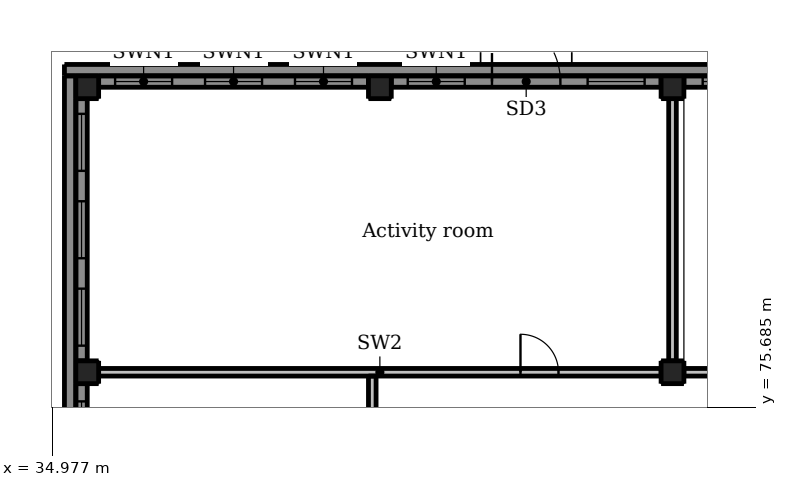
"""IFC4 building model, lengths in metres.
Left out: names, types, materials, properties, quantities, classifications, styles, units other than length and angle.
Written with IfcOpenShell. Run it as: python <this file> out.ifc"""

import sys

from ifc_helpers import new_model, si_unit, direction, frame, frame_2d, origin, origin_2d, place, context, subcontext, project, spatial, rectangle, extrude, element, fill, save


model = new_model("IFC4")
c1 = context("Model", 3, precision=1e-05, world=origin(), true_north=direction((0.0, 1.0)))
c2 = subcontext(c1, "Body", "Model", "MODEL_VIEW")
j1 = project(units=[si_unit("LENGTHUNIT", "METRE"), si_unit("PLANEANGLEUNIT", "RADIAN")], contexts=[c1])
p1 = place(None, origin())
s1 = spatial("IfcSite", under=j1, at=p1, CompositionType="ELEMENT")
p2 = place(p1, origin())
s2 = spatial("IfcBuilding", under=s1, at=p2, CompositionType="ELEMENT")
p3 = place(p2, origin())
s3 = spatial("IfcBuildingStorey", under=s2, at=p3, CompositionType="ELEMENT", Elevation=0.0)
for number, where, z_axis, x_axis in (
    (1, (35.9, 76.6, -0.3), (0.0, 0.0, 1.0), (1.0, 0.0, 0.0)),
    (2, (51.3, 76.6, -0.3), (0.0, 0.0, 1.0), (1.0, 0.0, 0.0)),
    (3, (35.9, 84.1, -0.3), (0.0, 0.0, 1.0), (1.0, 0.0, 0.0)),
    (4, (51.3, 84.1, -0.3), (0.0, 0.0, 1.0), (1.0, 0.0, 0.0)),
    (5, (43.6, 84.1, -0.3), (0.0, 0.0, 1.0), (1.0, 0.0, 0.0)),
):
    element("IfcColumn", number, at=place(p3, frame(where, z_axis=z_axis, x_axis=x_axis)), inside=s3, PredefinedType="COLUMN", context=c2, shape_type="SweptSolid", body=[
        extrude(rectangle(XDim=0.6, YDim=0.6, at=origin_2d()), origin(), (0.0, 0.0, 1.0), 5.5),
    ])
p4 = place(p3, frame((35.75, 69.0, 0.0), z_axis=(0.0, 0.0, 1.0), x_axis=(0.0, 1.0, 0.0)))
e6 = element("IfcWall", 6, at=p4, inside=s3, PredefinedType="SOLIDWALL", context=c2, shape_type="SweptSolid", body=[
    extrude(rectangle(XDim=7.3, YDim=0.3, at=frame_2d((3.65, 0.0))), origin(), (0.0, 0.0, 1.0), 4.3),
])
p5 = place(p4, frame((0.467, 0.0, 0.9)))
e7 = element("IfcOpeningElement", 7, at=p5, cuts=e6, PredefinedType="OPENING", context=c2, shape_type="SweptSolid", body=[
    extrude(rectangle(XDim=1.5, YDim=1.5, at=frame_2d((0.75, 0.75))), frame((0.0, 0.16, 0.0), z_axis=(0.0, -1.0, 0.0), x_axis=(1.0, 0.0, 0.0)), (0.0, 0.0, 1.0), 0.32),
])
p6 = place(p4, frame((2.9, 0.0, 0.9)))
e8 = element("IfcOpeningElement", 8, at=p6, cuts=e6, PredefinedType="OPENING", context=c2, shape_type="SweptSolid", body=[
    extrude(rectangle(XDim=1.5, YDim=1.5, at=frame_2d((0.75, 0.75))), frame((0.0, 0.16, 0.0), z_axis=(0.0, -1.0, 0.0), x_axis=(1.0, 0.0, 0.0)), (0.0, 0.0, 1.0), 0.32),
])
p7 = place(p4, frame((5.333, 0.0, 0.9)))
e9 = element("IfcOpeningElement", 9, at=p7, cuts=e6, PredefinedType="OPENING", context=c2, shape_type="SweptSolid", body=[
    extrude(rectangle(XDim=1.5, YDim=1.5, at=frame_2d((0.75, 0.75))), frame((0.0, 0.16, 0.0), z_axis=(0.0, -1.0, 0.0), x_axis=(1.0, 0.0, 0.0)), (0.0, 0.0, 1.0), 0.32),
])
p8 = place(p3, frame((35.75, 76.9, 0.0), z_axis=(0.0, 0.0, 1.0), x_axis=(0.0, 1.0, 0.0)))
e10 = element("IfcWall", 10, at=p8, inside=s3, PredefinedType="SOLIDWALL", context=c2, shape_type="SweptSolid", body=[
    extrude(rectangle(XDim=6.9, YDim=0.3, at=frame_2d((3.45, 0.0))), origin(), (0.0, 0.0, 1.0), 4.3),
])
p9 = place(p8, frame((0.4, 0.0, 0.9)))
e11 = element("IfcOpeningElement", 11, at=p9, cuts=e10, PredefinedType="OPENING", context=c2, shape_type="SweptSolid", body=[
    extrude(rectangle(XDim=1.5, YDim=1.5, at=frame_2d((0.75, 0.75))), frame((0.0, 0.16, 0.0), z_axis=(0.0, -1.0, 0.0), x_axis=(1.0, 0.0, 0.0)), (0.0, 0.0, 1.0), 0.32),
])
p10 = place(p8, frame((2.7, 0.0, 0.9)))
e12 = element("IfcOpeningElement", 12, at=p10, cuts=e10, PredefinedType="OPENING", context=c2, shape_type="SweptSolid", body=[
    extrude(rectangle(XDim=1.5, YDim=1.5, at=frame_2d((0.75, 0.75))), frame((0.0, 0.16, 0.0), z_axis=(0.0, -1.0, 0.0), x_axis=(1.0, 0.0, 0.0)), (0.0, 0.0, 1.0), 0.32),
])
p11 = place(p8, frame((5.0, 0.0, 0.9)))
e13 = element("IfcOpeningElement", 13, at=p11, cuts=e10, PredefinedType="OPENING", context=c2, shape_type="SweptSolid", body=[
    extrude(rectangle(XDim=1.5, YDim=1.5, at=frame_2d((0.75, 0.75))), frame((0.0, 0.16, 0.0), z_axis=(0.0, -1.0, 0.0), x_axis=(1.0, 0.0, 0.0)), (0.0, 0.0, 1.0), 0.32),
])
p12 = place(p3, frame((36.2, 84.25, 0.0), z_axis=(0.0, 0.0, 1.0), x_axis=(1.0, 0.0, 0.0)))
e14 = element("IfcWall", 14, at=p12, inside=s3, PredefinedType="SOLIDWALL", context=c2, shape_type="SweptSolid", body=[
    extrude(rectangle(XDim=7.1, YDim=0.3, at=frame_2d((3.55, 0.0))), origin(), (0.0, 0.0, 1.0), 4.3),
])
p13 = place(p12, frame((0.433, 0.0, 0.9)))
e15 = element("IfcOpeningElement", 15, at=p13, cuts=e14, PredefinedType="OPENING", context=c2, shape_type="SweptSolid", body=[
    extrude(rectangle(XDim=1.5, YDim=1.5, at=frame_2d((0.75, 0.75))), frame((0.0, 0.16, 0.0), z_axis=(0.0, -1.0, 0.0), x_axis=(1.0, 0.0, 0.0)), (0.0, 0.0, 1.0), 0.32),
])
p14 = place(p12, frame((2.8, 0.0, 0.9)))
e16 = element("IfcOpeningElement", 16, at=p14, cuts=e14, PredefinedType="OPENING", context=c2, shape_type="SweptSolid", body=[
    extrude(rectangle(XDim=1.5, YDim=1.5, at=frame_2d((0.75, 0.75))), frame((0.0, 0.16, 0.0), z_axis=(0.0, -1.0, 0.0), x_axis=(1.0, 0.0, 0.0)), (0.0, 0.0, 1.0), 0.32),
])
p15 = place(p12, frame((5.167, 0.0, 0.9)))
e17 = element("IfcOpeningElement", 17, at=p15, cuts=e14, PredefinedType="OPENING", context=c2, shape_type="SweptSolid", body=[
    extrude(rectangle(XDim=1.5, YDim=1.5, at=frame_2d((0.75, 0.75))), frame((0.0, 0.16, 0.0), z_axis=(0.0, -1.0, 0.0), x_axis=(1.0, 0.0, 0.0)), (0.0, 0.0, 1.0), 0.32),
])
p16 = place(p3, frame((43.9, 84.25, 0.0), z_axis=(0.0, 0.0, 1.0), x_axis=(1.0, 0.0, 0.0)))
e18 = element("IfcWall", 18, at=p16, inside=s3, PredefinedType="SOLIDWALL", context=c2, shape_type="SweptSolid", body=[
    extrude(rectangle(XDim=7.1, YDim=0.3, at=frame_2d((3.55, 0.0))), origin(), (0.0, 0.0, 1.0), 4.3),
])
p17 = place(p16, frame((2.65, 0.0, 0.0)))
e19 = element("IfcOpeningElement", 19, at=p17, cuts=e18, PredefinedType="OPENING", context=c2, shape_type="SweptSolid", body=[
    extrude(rectangle(XDim=1.8, YDim=2.1, at=frame_2d((0.9, 1.05))), frame((0.0, 0.16, 0.0), z_axis=(0.0, -1.0, 0.0), x_axis=(1.0, 0.0, 0.0)), (0.0, 0.0, 1.0), 0.32),
])
p18 = place(p16, frame((0.433, 0.0, 0.9)))
e20 = element("IfcOpeningElement", 20, at=p18, cuts=e18, PredefinedType="OPENING", context=c2, shape_type="SweptSolid", body=[
    extrude(rectangle(XDim=1.5, YDim=1.5, at=frame_2d((0.75, 0.75))), frame((0.0, 0.16, 0.0), z_axis=(0.0, -1.0, 0.0), x_axis=(1.0, 0.0, 0.0)), (0.0, 0.0, 1.0), 0.32),
])
p19 = place(p16, frame((5.167, 0.0, 0.9)))
e21 = element("IfcOpeningElement", 21, at=p19, cuts=e18, PredefinedType="OPENING", context=c2, shape_type="SweptSolid", body=[
    extrude(rectangle(XDim=1.5, YDim=1.5, at=frame_2d((0.75, 0.75))), frame((0.0, 0.16, 0.0), z_axis=(0.0, -1.0, 0.0), x_axis=(1.0, 0.0, 0.0)), (0.0, 0.0, 1.0), 0.32),
])
p20 = place(p3, frame((51.6, 84.25, 0.0), z_axis=(0.0, 0.0, 1.0), x_axis=(1.0, 0.0, 0.0)))
e22 = element("IfcWall", 22, at=p20, inside=s3, PredefinedType="SOLIDWALL", context=c2, shape_type="SweptSolid", body=[
    extrude(rectangle(XDim=7.467, YDim=0.3, at=frame_2d((3.733, 0.0))), origin(), (0.0, 0.0, 1.0), 4.3),
])
p21 = place(p20, frame((0.494, 0.0, 0.9)))
e23 = element("IfcOpeningElement", 23, at=p21, cuts=e22, PredefinedType="OPENING", context=c2, shape_type="SweptSolid", body=[
    extrude(rectangle(XDim=1.5, YDim=1.5, at=frame_2d((0.75, 0.75))), frame((0.0, 0.16, 0.0), z_axis=(0.0, -1.0, 0.0), x_axis=(1.0, 0.0, 0.0)), (0.0, 0.0, 1.0), 0.32),
])
p22 = place(p20, frame((2.983, 0.0, 0.9)))
e24 = element("IfcOpeningElement", 24, at=p22, cuts=e22, PredefinedType="OPENING", context=c2, shape_type="SweptSolid", body=[
    extrude(rectangle(XDim=1.5, YDim=1.5, at=frame_2d((0.75, 0.75))), frame((0.0, 0.16, 0.0), z_axis=(0.0, -1.0, 0.0), x_axis=(1.0, 0.0, 0.0)), (0.0, 0.0, 1.0), 0.32),
])
p23 = place(p20, frame((5.472, 0.0, 0.9)))
e25 = element("IfcOpeningElement", 25, at=p23, cuts=e22, PredefinedType="OPENING", context=c2, shape_type="SweptSolid", body=[
    extrude(rectangle(XDim=1.5, YDim=1.5, at=frame_2d((0.75, 0.75))), frame((0.0, 0.16, 0.0), z_axis=(0.0, -1.0, 0.0), x_axis=(1.0, 0.0, 0.0)), (0.0, 0.0, 1.0), 0.32),
])
p24 = place(p3, frame((35.3, 84.55, -0.3), z_axis=(0.0, 0.0, 1.0), x_axis=(1.0, 0.0, 0.0)))
e26 = element("IfcWall", 26, at=p24, inside=s3, PredefinedType="SOLIDWALL", context=c2, shape_type="SweptSolid", body=[
    extrude(rectangle(XDim=64.7, YDim=0.3, at=frame_2d((32.35, 0.0))), origin(), (0.0, 0.0, 1.0), 0.3),
])
p25 = place(p3, frame((35.45, 8.0, -0.3), z_axis=(0.0, 0.0, 1.0), x_axis=(0.0, 1.0, 0.0)))
e27 = element("IfcWall", 27, at=p25, inside=s3, PredefinedType="SOLIDWALL", context=c2, shape_type="SweptSolid", body=[
    extrude(rectangle(XDim=76.4, YDim=0.3, at=frame_2d((38.2, 0.0))), origin(), (0.0, 0.0, 1.0), 0.3),
])
p26 = place(p3, frame((43.4, 68.8, 0.0), z_axis=(0.0, 0.0, 1.0), x_axis=(0.0, 1.0, 0.0)))
e28 = element("IfcWall", 28, at=p26, inside=s3, PredefinedType="PARTITIONING", context=c2, shape_type="SweptSolid", body=[
    extrude(rectangle(XDim=7.7, YDim=0.2, at=frame_2d((3.85, 0.0))), origin(), (0.0, 0.0, 1.0), 4.1),
])
p27 = place(p26, frame((3.35, 0.0, 0.0)))
e29 = element("IfcOpeningElement", 29, at=p27, cuts=e28, PredefinedType="OPENING", context=c2, shape_type="SweptSolid", body=[
    extrude(rectangle(XDim=1.0, YDim=2.1, at=frame_2d((0.5, 1.05))), frame((0.0, 0.11, 0.0), z_axis=(0.0, -1.0, 0.0), x_axis=(1.0, 0.0, 0.0)), (0.0, 0.0, 1.0), 0.22),
])
p28 = place(p3, frame((36.2, 76.6, 0.0), z_axis=(0.0, 0.0, 1.0), x_axis=(1.0, 0.0, 0.0)))
e30 = element("IfcWall", 30, at=p28, inside=s3, PredefinedType="PARTITIONING", context=c2, shape_type="SweptSolid", body=[
    extrude(rectangle(XDim=14.8, YDim=0.2, at=frame_2d((7.4, 0.0))), origin(), (0.0, 0.0, 1.0), 4.1),
])
p29 = place(p28, frame((11.1, 0.0, 0.0)))
e31 = element("IfcOpeningElement", 31, at=p29, cuts=e30, PredefinedType="OPENING", context=c2, shape_type="SweptSolid", body=[
    extrude(rectangle(XDim=1.0, YDim=2.1, at=frame_2d((0.5, 1.05))), frame((0.0, 0.11, 0.0), z_axis=(0.0, -1.0, 0.0), x_axis=(1.0, 0.0, 0.0)), (0.0, 0.0, 1.0), 0.22),
])
p30 = place(p3, frame((51.3, 76.9, 0.0), z_axis=(0.0, 0.0, 1.0), x_axis=(0.0, 1.0, 0.0)))
e32 = element("IfcWall", 32, at=p30, inside=s3, PredefinedType="PARTITIONING", context=c2, shape_type="SweptSolid", body=[
    extrude(rectangle(XDim=6.9, YDim=0.2, at=frame_2d((3.45, 0.0))), origin(), (0.0, 0.0, 1.0), 4.1),
])
p31 = place(p3, frame((51.6, 76.6, 0.0), z_axis=(0.0, 0.0, 1.0), x_axis=(1.0, 0.0, 0.0)))
e33 = element("IfcWall", 33, at=p31, inside=s3, PredefinedType="PARTITIONING", context=c2, shape_type="SweptSolid", body=[
    extrude(rectangle(XDim=7.667, YDim=0.2, at=frame_2d((3.833, 0.0))), origin(), (0.0, 0.0, 1.0), 4.1),
])
p32 = place(p31, frame((3.333, 0.0, 0.0)))
e34 = element("IfcOpeningElement", 34, at=p32, cuts=e33, PredefinedType="OPENING", context=c2, shape_type="SweptSolid", body=[
    extrude(rectangle(XDim=1.0, YDim=2.1, at=frame_2d((0.5, 1.05))), frame((0.0, 0.11, 0.0), z_axis=(0.0, -1.0, 0.0), x_axis=(1.0, 0.0, 0.0)), (0.0, 0.0, 1.0), 0.22),
])
p33 = place(p7, origin())
e35 = element("IfcWindow", 35, at=p33, inside=s3, PartitioningType="DOUBLE_PANEL_HORIZONTAL", PredefinedType="WINDOW", context=c2, shape_type="SweptSolid", body=[
    extrude(rectangle(XDim=1.5, YDim=1.5, at=frame_2d((0.75, 0.75))), frame((0.0, 0.03, 0.0), z_axis=(0.0, -1.0, 0.0), x_axis=(1.0, 0.0, 0.0)), (0.0, 0.0, 1.0), 0.06),
])
fill(e9, e35)
p34 = place(p9, origin())
e36 = element("IfcWindow", 36, at=p34, inside=s3, PartitioningType="DOUBLE_PANEL_HORIZONTAL", PredefinedType="WINDOW", context=c2, shape_type="SweptSolid", body=[
    extrude(rectangle(XDim=1.5, YDim=1.5, at=frame_2d((0.75, 0.75))), frame((0.0, 0.03, 0.0), z_axis=(0.0, -1.0, 0.0), x_axis=(1.0, 0.0, 0.0)), (0.0, 0.0, 1.0), 0.06),
])
fill(e11, e36)
p35 = place(p10, origin())
e37 = element("IfcWindow", 37, at=p35, inside=s3, PartitioningType="DOUBLE_PANEL_HORIZONTAL", PredefinedType="WINDOW", context=c2, shape_type="SweptSolid", body=[
    extrude(rectangle(XDim=1.5, YDim=1.5, at=frame_2d((0.75, 0.75))), frame((0.0, 0.03, 0.0), z_axis=(0.0, -1.0, 0.0), x_axis=(1.0, 0.0, 0.0)), (0.0, 0.0, 1.0), 0.06),
])
fill(e12, e37)
p36 = place(p11, origin())
e38 = element("IfcWindow", 38, at=p36, inside=s3, PartitioningType="DOUBLE_PANEL_HORIZONTAL", PredefinedType="WINDOW", context=c2, shape_type="SweptSolid", body=[
    extrude(rectangle(XDim=1.5, YDim=1.5, at=frame_2d((0.75, 0.75))), frame((0.0, 0.03, 0.0), z_axis=(0.0, -1.0, 0.0), x_axis=(1.0, 0.0, 0.0)), (0.0, 0.0, 1.0), 0.06),
])
fill(e13, e38)
p37 = place(p13, origin())
e39 = element("IfcWindow", 39, at=p37, inside=s3, PartitioningType="DOUBLE_PANEL_HORIZONTAL", PredefinedType="WINDOW", context=c2, shape_type="SweptSolid", body=[
    extrude(rectangle(XDim=1.5, YDim=1.5, at=frame_2d((0.75, 0.75))), frame((0.0, 0.03, 0.0), z_axis=(0.0, -1.0, 0.0), x_axis=(1.0, 0.0, 0.0)), (0.0, 0.0, 1.0), 0.06),
])
fill(e15, e39)
p38 = place(p14, origin())
e40 = element("IfcWindow", 40, at=p38, inside=s3, PartitioningType="DOUBLE_PANEL_HORIZONTAL", PredefinedType="WINDOW", context=c2, shape_type="SweptSolid", body=[
    extrude(rectangle(XDim=1.5, YDim=1.5, at=frame_2d((0.75, 0.75))), frame((0.0, 0.03, 0.0), z_axis=(0.0, -1.0, 0.0), x_axis=(1.0, 0.0, 0.0)), (0.0, 0.0, 1.0), 0.06),
])
fill(e16, e40)
p39 = place(p15, origin())
e41 = element("IfcWindow", 41, at=p39, inside=s3, PartitioningType="DOUBLE_PANEL_HORIZONTAL", PredefinedType="WINDOW", context=c2, shape_type="SweptSolid", body=[
    extrude(rectangle(XDim=1.5, YDim=1.5, at=frame_2d((0.75, 0.75))), frame((0.0, 0.03, 0.0), z_axis=(0.0, -1.0, 0.0), x_axis=(1.0, 0.0, 0.0)), (0.0, 0.0, 1.0), 0.06),
])
fill(e17, e41)
p40 = place(p17, origin())
e42 = element("IfcDoor", 42, at=p40, inside=s3, OperationType="DOUBLE_DOOR_SINGLE_SWING", PredefinedType="DOOR", context=c2, shape_type="SweptSolid", body=[
    extrude(rectangle(XDim=1.8, YDim=2.1, at=frame_2d((0.9, 1.05))), frame((0.0, 0.025, 0.0), z_axis=(0.0, -1.0, 0.0), x_axis=(1.0, 0.0, 0.0)), (0.0, 0.0, 1.0), 0.05),
])
fill(e19, e42)
p41 = place(p18, origin())
e43 = element("IfcWindow", 43, at=p41, inside=s3, PartitioningType="DOUBLE_PANEL_HORIZONTAL", PredefinedType="WINDOW", context=c2, shape_type="SweptSolid", body=[
    extrude(rectangle(XDim=1.5, YDim=1.5, at=frame_2d((0.75, 0.75))), frame((0.0, 0.03, 0.0), z_axis=(0.0, -1.0, 0.0), x_axis=(1.0, 0.0, 0.0)), (0.0, 0.0, 1.0), 0.06),
])
fill(e20, e43)
p42 = place(p19, origin())
e44 = element("IfcWindow", 44, at=p42, inside=s3, PartitioningType="DOUBLE_PANEL_HORIZONTAL", PredefinedType="WINDOW", context=c2, shape_type="SweptSolid", body=[
    extrude(rectangle(XDim=1.5, YDim=1.5, at=frame_2d((0.75, 0.75))), frame((0.0, 0.03, 0.0), z_axis=(0.0, -1.0, 0.0), x_axis=(1.0, 0.0, 0.0)), (0.0, 0.0, 1.0), 0.06),
])
fill(e21, e44)
p43 = place(p21, origin())
e45 = element("IfcWindow", 45, at=p43, inside=s3, PartitioningType="DOUBLE_PANEL_HORIZONTAL", PredefinedType="WINDOW", context=c2, shape_type="SweptSolid", body=[
    extrude(rectangle(XDim=1.5, YDim=1.5, at=frame_2d((0.75, 0.75))), frame((0.0, 0.03, 0.0), z_axis=(0.0, -1.0, 0.0), x_axis=(1.0, 0.0, 0.0)), (0.0, 0.0, 1.0), 0.06),
])
fill(e23, e45)
p44 = place(p29, origin())
e46 = element("IfcDoor", 46, at=p44, inside=s3, OperationType="SINGLE_SWING_LEFT", PredefinedType="DOOR", context=c2, shape_type="SweptSolid", body=[
    extrude(rectangle(XDim=1.0, YDim=2.1, at=frame_2d((0.5, 1.05))), frame((0.0, 0.025, 0.0), z_axis=(0.0, -1.0, 0.0), x_axis=(1.0, 0.0, 0.0)), (0.0, 0.0, 1.0), 0.05),
])
fill(e31, e46)
save(model, sys.argv[1])
